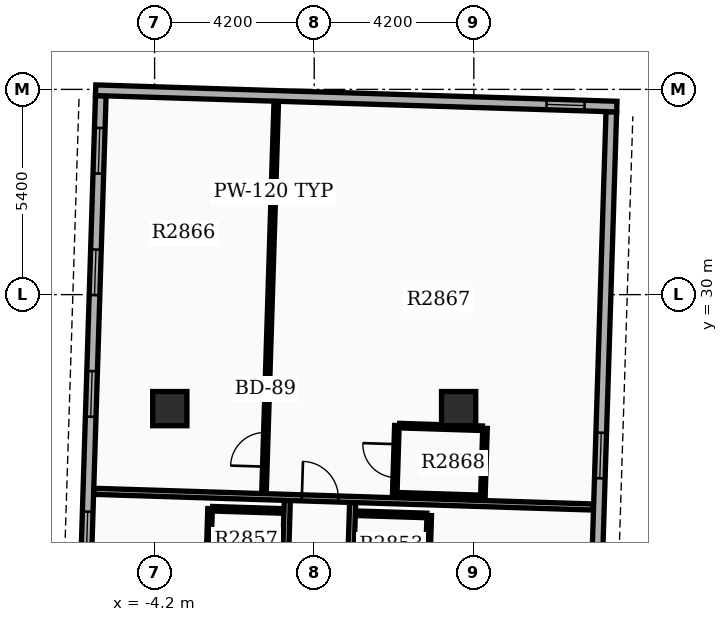
"""IFC4 building model, lengths in metres.
Left out: names, types, materials, properties, quantities, classifications, styles, units other than length and angle.
Written with IfcOpenShell. Run it as: python <this file> out.ifc"""

import sys

from ifc_helpers import new_model, si_unit, direction, frame, frame_2d, origin, origin_2d, place, context, subcontext, project, spatial, rectangle, extrude, element, fill, save


model = new_model("IFC4")
c1 = context("Model", 3, precision=1e-05, world=origin(), true_north=direction((0.0, 1.0)))
c2 = subcontext(c1, "Body", "Model", "MODEL_VIEW")
j1 = project(units=[si_unit("LENGTHUNIT", "METRE"), si_unit("PLANEANGLEUNIT", "RADIAN")], contexts=[c1])
p1 = place(None, origin())
s1 = spatial("IfcSite", under=j1, at=p1, CompositionType="ELEMENT")
p2 = place(p1, origin())
s2 = spatial("IfcBuilding", under=s1, at=p2, CompositionType="ELEMENT")
p3 = place(p2, frame((0.0, 0.0, 176.1)))
s3 = spatial("IfcBuildingStorey", under=s2, at=p3, CompositionType="ELEMENT", Elevation=176.1)
for number, where, z_axis, x_axis in (
    (1, (-3.8, 27.0, 0.0), (0.0, 0.0, 1.0), (1.0, 0.0, 0.0)),
    (2, (3.8, 27.0, 0.0), (0.0, 0.0, 1.0), (1.0, 0.0, 0.0)),
):
    element("IfcColumn", number, at=place(p3, frame(where, z_axis=z_axis, x_axis=x_axis)), inside=s3, PredefinedType="COLUMN", context=c2, shape_type="SweptSolid", body=[
        extrude(rectangle(XDim=0.9, YDim=0.9, at=origin_2d()), origin(), (0.0, 0.0, 1.0), 3.9),
    ])
p4 = place(p3, frame((7.186, 14.721, 0.0), z_axis=(0.0, 0.0, 1.0), x_axis=(0.031410322165, 0.999506574096, 0.0)))
e3 = element("IfcWall", 3, at=p4, inside=s3, PredefinedType="STANDARD", context=c2, shape_type="SweptSolid", body=[
    extrude(rectangle(XDim=20.1, YDim=0.28, at=frame_2d((10.05, 0.0))), origin(), (0.0, 0.0, 1.0), 2.97),
])
p5 = place(p4, frame((0.85, 0.0, 0.8)))
e4 = element("IfcOpeningElement", 4, at=p5, cuts=e3, PredefinedType="OPENING", context=c2, shape_type="SweptSolid", body=[
    extrude(rectangle(XDim=1.2, YDim=1.6, at=frame_2d((0.6, 0.8))), frame((0.0, 0.15, 0.0), z_axis=(0.0, -1.0, 0.0), x_axis=(1.0, 0.0, 0.0)), (0.0, 0.0, 1.0), 0.3),
])
p6 = place(p4, frame((4.05, 0.0, 0.8)))
e5 = element("IfcOpeningElement", 5, at=p6, cuts=e3, PredefinedType="OPENING", context=c2, shape_type="SweptSolid", body=[
    extrude(rectangle(XDim=1.2, YDim=1.6, at=frame_2d((0.6, 0.8))), frame((0.0, 0.15, 0.0), z_axis=(0.0, -1.0, 0.0), x_axis=(1.0, 0.0, 0.0)), (0.0, 0.0, 1.0), 0.3),
])
p7 = place(p4, frame((7.25, 0.0, 0.8)))
e6 = element("IfcOpeningElement", 6, at=p7, cuts=e3, PredefinedType="OPENING", context=c2, shape_type="SweptSolid", body=[
    extrude(rectangle(XDim=1.2, YDim=1.6, at=frame_2d((0.6, 0.8))), frame((0.0, 0.15, 0.0), z_axis=(0.0, -1.0, 0.0), x_axis=(1.0, 0.0, 0.0)), (0.0, 0.0, 1.0), 0.3),
])
p8 = place(p4, frame((10.45, 0.0, 0.8)))
e7 = element("IfcOpeningElement", 7, at=p8, cuts=e3, PredefinedType="OPENING", context=c2, shape_type="SweptSolid", body=[
    extrude(rectangle(XDim=1.2, YDim=1.6, at=frame_2d((0.6, 0.8))), frame((0.0, 0.15, 0.0), z_axis=(0.0, -1.0, 0.0), x_axis=(1.0, 0.0, 0.0)), (0.0, 0.0, 1.0), 0.3),
])
p9 = place(p3, frame((-5.616, 35.234, 0.0), z_axis=(0.0, 0.0, 1.0), x_axis=(-0.031398187845, -0.999506955354, 0.0)))
e8 = element("IfcWall", 8, at=p9, inside=s3, PredefinedType="STANDARD", context=c2, shape_type="SweptSolid", body=[
    extrude(rectangle(XDim=20.1, YDim=0.28, at=frame_2d((10.05, 0.0))), origin(), (0.0, 0.0, 1.0), 2.97),
])
p10 = place(p9, frame((0.85, 0.0, 0.8)))
e9 = element("IfcOpeningElement", 9, at=p10, cuts=e8, PredefinedType="OPENING", context=c2, shape_type="SweptSolid", body=[
    extrude(rectangle(XDim=1.2, YDim=1.6, at=frame_2d((0.6, 0.8))), frame((0.0, 0.15, 0.0), z_axis=(0.0, -1.0, 0.0), x_axis=(1.0, 0.0, 0.0)), (0.0, 0.0, 1.0), 0.3),
])
p11 = place(p9, frame((4.05, 0.0, 0.8)))
e10 = element("IfcOpeningElement", 10, at=p11, cuts=e8, PredefinedType="OPENING", context=c2, shape_type="SweptSolid", body=[
    extrude(rectangle(XDim=1.2, YDim=1.6, at=frame_2d((0.6, 0.8))), frame((0.0, 0.15, 0.0), z_axis=(0.0, -1.0, 0.0), x_axis=(1.0, 0.0, 0.0)), (0.0, 0.0, 1.0), 0.3),
])
p12 = place(p9, frame((7.25, 0.0, 0.8)))
e11 = element("IfcOpeningElement", 11, at=p12, cuts=e8, PredefinedType="OPENING", context=c2, shape_type="SweptSolid", body=[
    extrude(rectangle(XDim=1.2, YDim=1.6, at=frame_2d((0.6, 0.8))), frame((0.0, 0.15, 0.0), z_axis=(0.0, -1.0, 0.0), x_axis=(1.0, 0.0, 0.0)), (0.0, 0.0, 1.0), 0.3),
])
p13 = place(p9, frame((10.95, 0.0, 0.8)))
e12 = element("IfcOpeningElement", 12, at=p13, cuts=e8, PredefinedType="OPENING", context=c2, shape_type="SweptSolid", body=[
    extrude(rectangle(XDim=1.2, YDim=1.6, at=frame_2d((0.6, 0.8))), frame((0.0, 0.15, 0.0), z_axis=(0.0, -1.0, 0.0), x_axis=(1.0, 0.0, 0.0)), (0.0, 0.0, 1.0), 0.3),
])
p14 = place(p9, frame((14.799, 0.0, 0.85)))
e13 = element("IfcOpeningElement", 13, at=p14, cuts=e8, PredefinedType="OPENING", context=c2, shape_type="SweptSolid", body=[
    extrude(rectangle(XDim=1.2, YDim=1.6, at=frame_2d((0.6, 0.8))), frame((0.0, 0.15, 0.0), z_axis=(0.0, -1.0, 0.0), x_axis=(1.0, 0.0, 0.0)), (0.0, 0.0, 1.0), 0.3),
])
p15 = place(p3, frame((7.962, 34.947, 0.0), z_axis=(0.0, 0.0, 1.0), x_axis=(-0.999506679556, 0.031406966164, 0.0)))
e14 = element("IfcWall", 14, at=p15, inside=s3, PredefinedType="STANDARD", context=c2, shape_type="SweptSolid", body=[
    extrude(rectangle(XDim=13.72, YDim=0.28, at=frame_2d((6.86, 0.0))), origin(), (0.0, 0.0, 1.0), 2.97),
])
p16 = place(p15, frame((0.85, 0.0, 0.85)))
e15 = element("IfcOpeningElement", 15, at=p16, cuts=e14, PredefinedType="OPENING", context=c2, shape_type="SweptSolid", body=[
    extrude(rectangle(XDim=1.0, YDim=1.5, at=frame_2d((0.5, 0.75))), frame((0.0, 0.15, 0.0), z_axis=(0.0, -1.0, 0.0), x_axis=(1.0, 0.0, 0.0)), (0.0, 0.0, 1.0), 0.3),
])
p17 = place(p3, frame((0.706, 14.835, 0.0), z_axis=(0.0, 0.0, 1.0), x_axis=(0.031411552371, 0.999506535435, 0.0)))
e16 = element("IfcWall", 16, at=p17, inside=s3, PredefinedType="PARTITIONING", context=c2, shape_type="SweptSolid", body=[
    extrude(rectangle(XDim=9.7, YDim=0.16, at=frame_2d((4.85, 0.0))), origin(), (0.0, 0.0, 1.0), 2.96),
])
p18 = place(p17, frame((2.575, 0.0, 0.0)))
e17 = element("IfcOpeningElement", 17, at=p18, cuts=e16, PredefinedType="OPENING", context=c2, shape_type="SweptSolid", body=[
    extrude(rectangle(XDim=0.96, YDim=2.15, at=frame_2d((0.48, 1.075))), frame((0.0, 0.09, 0.0), z_axis=(0.0, -1.0, 0.0), x_axis=(1.0, 0.0, 0.0)), (0.0, 0.0, 1.0), 0.18),
])
p19 = place(p17, frame((6.467, 0.0, 0.0)))
e18 = element("IfcOpeningElement", 18, at=p19, cuts=e16, PredefinedType="OPENING", context=c2, shape_type="SweptSolid", body=[
    extrude(rectangle(XDim=0.96, YDim=2.15, at=frame_2d((0.48, 1.075))), frame((0.0, 0.09, 0.0), z_axis=(0.0, -1.0, 0.0), x_axis=(1.0, 0.0, 0.0)), (0.0, 0.0, 1.0), 0.18),
])
p20 = place(p3, frame((1.142, 24.246, 0.0), z_axis=(0.0, 0.0, 1.0), x_axis=(0.999507221803, -0.031389704724, 0.0)))
e19 = element("IfcWall", 19, at=p20, inside=s3, PredefinedType="PARTITIONING", context=c2, shape_type="SweptSolid", body=[
    extrude(rectangle(XDim=1.82, YDim=0.12, at=frame_2d((0.91, 0.0))), origin(), (0.0, 0.0, 1.0), 2.96),
])
p21 = place(p3, frame((2.976, 22.588, 0.0), z_axis=(0.0, 0.0, 1.0), x_axis=(0.031277621856, 0.999510735496, 0.0)))
e20 = element("IfcWall", 20, at=p21, inside=s3, PredefinedType="PARTITIONING", context=c2, shape_type="SweptSolid", body=[
    extrude(rectangle(XDim=1.6, YDim=0.12, at=frame_2d((0.8, 0.0))), origin(), (0.0, 0.0, 1.0), 2.96),
])
p22 = place(p3, frame((-1.013, 14.889, 0.0), z_axis=(0.0, 0.0, 1.0), x_axis=(0.031410762168, 0.999506560269, 0.0)))
e21 = element("IfcWall", 21, at=p22, inside=s3, PredefinedType="PARTITIONING", context=c2, shape_type="SweptSolid", body=[
    extrude(rectangle(XDim=9.7, YDim=0.16, at=frame_2d((4.85, 0.0))), origin(), (0.0, 0.0, 1.0), 2.96),
])
p23 = place(p22, frame((2.575, 0.0, 0.0)))
e22 = element("IfcOpeningElement", 22, at=p23, cuts=e21, PredefinedType="OPENING", context=c2, shape_type="SweptSolid", body=[
    extrude(rectangle(XDim=0.96, YDim=2.15, at=frame_2d((0.48, 1.075))), frame((0.0, 0.09, 0.0), z_axis=(0.0, -1.0, 0.0), x_axis=(1.0, 0.0, 0.0)), (0.0, 0.0, 1.0), 0.18),
])
p24 = place(p22, frame((6.467, 0.0, 0.0)))
e23 = element("IfcOpeningElement", 23, at=p24, cuts=e21, PredefinedType="OPENING", context=c2, shape_type="SweptSolid", body=[
    extrude(rectangle(XDim=0.96, YDim=2.15, at=frame_2d((0.48, 1.075))), frame((0.0, 0.09, 0.0), z_axis=(0.0, -1.0, 0.0), x_axis=(1.0, 0.0, 0.0)), (0.0, 0.0, 1.0), 0.18),
])
p25 = place(p3, frame((-2.676, 24.366, 0.0), z_axis=(0.0, 0.0, 1.0), x_axis=(0.999503004171, -0.03152371574, 0.0)))
e24 = element("IfcWall", 24, at=p25, inside=s3, PredefinedType="PARTITIONING", context=c2, shape_type="SweptSolid", body=[
    extrude(rectangle(XDim=1.82, YDim=0.12, at=frame_2d((0.91, 0.0))), origin(), (0.0, 0.0, 1.0), 2.96),
])
p26 = place(p3, frame((-2.791, 22.769, 0.0), z_axis=(0.0, 0.0, 1.0), x_axis=(0.031430045267, 0.999505954087, 0.0)))
e25 = element("IfcWall", 25, at=p26, inside=s3, PredefinedType="PARTITIONING", context=c2, shape_type="SweptSolid", body=[
    extrude(rectangle(XDim=1.6, YDim=0.12, at=frame_2d((0.8, 0.0))), origin(), (0.0, 0.0, 1.0), 2.96),
])
p27 = place(p3, frame((-5.795, 24.824, 0.0), z_axis=(0.0, 0.0, 1.0), x_axis=(0.999507189267, -0.031390740738, 0.0)))
e26 = element("IfcWall", 26, at=p27, inside=s3, PredefinedType="PARTITIONING", context=c2, shape_type="SweptSolid", body=[
    extrude(rectangle(XDim=13.144, YDim=0.16, at=frame_2d((6.572, 0.0))), origin(), (0.0, 0.0, 1.0), 2.96),
])
p28 = place(p27, frame((5.472, 0.0, 0.0)))
e27 = element("IfcOpeningElement", 27, at=p28, cuts=e26, PredefinedType="OPENING", context=c2, shape_type="SweptSolid", body=[
    extrude(rectangle(XDim=0.96, YDim=2.15, at=frame_2d((0.48, 1.075))), frame((0.0, 0.09, 0.0), z_axis=(0.0, -1.0, 0.0), x_axis=(1.0, 0.0, 0.0)), (0.0, 0.0, 1.0), 0.18),
])
p29 = place(p3, frame((-1.323, 24.774, 0.0), z_axis=(0.0, 0.0, 1.0), x_axis=(0.031416574993, 0.999506377576, 0.0)))
e28 = element("IfcWall", 28, at=p29, inside=s3, PredefinedType="PARTITIONING", context=c2, shape_type="SweptSolid", body=[
    extrude(rectangle(XDim=10.312, YDim=0.12, at=frame_2d((5.156, 0.0))), origin(), (0.0, 0.0, 1.0), 2.96),
])
p30 = place(p29, frame((0.7, 0.0, 0.0)))
e29 = element("IfcOpeningElement", 29, at=p30, cuts=e28, PredefinedType="OPENING", context=c2, shape_type="SweptSolid", body=[
    extrude(rectangle(XDim=0.9, YDim=2.1, at=frame_2d((0.45, 1.05))), frame((0.0, 0.07, 0.0), z_axis=(0.0, -1.0, 0.0), x_axis=(1.0, 0.0, 0.0)), (0.0, 0.0, 1.0), 0.14),
])
p31 = place(p3, frame((2.118, 24.736, 0.0), z_axis=(0.0, 0.0, 1.0), x_axis=(0.03152371574, 0.999503004171, 0.0)))
e30 = element("IfcWall", 30, at=p31, inside=s3, PredefinedType="PARTITIONING", context=c2, shape_type="SweptSolid", body=[
    extrude(rectangle(XDim=1.82, YDim=0.12, at=frame_2d((0.91, 0.0))), origin(), (0.0, 0.0, 1.0), 2.96),
])
p32 = place(p31, frame((0.45, 0.0, 0.0)))
e31 = element("IfcOpeningElement", 31, at=p32, cuts=e30, PredefinedType="OPENING", context=c2, shape_type="SweptSolid", body=[
    extrude(rectangle(XDim=0.88, YDim=2.1, at=frame_2d((0.44, 1.05))), frame((0.0, 0.07, 0.0), z_axis=(0.0, -1.0, 0.0), x_axis=(1.0, 0.0, 0.0)), (0.0, 0.0, 1.0), 0.14),
])
p33 = place(p3, frame((4.437, 24.663, 0.0), z_axis=(0.0, 0.0, 1.0), x_axis=(0.031255692016, 0.999511421504, 0.0)))
e32 = element("IfcWall", 32, at=p33, inside=s3, PredefinedType="PARTITIONING", context=c2, shape_type="SweptSolid", body=[
    extrude(rectangle(XDim=1.82, YDim=0.12, at=frame_2d((0.91, 0.0))), origin(), (0.0, 0.0, 1.0), 2.96),
])
for number, where, z_axis, x_axis in (
    (33, (2.188, 24.733, 0.0), (0.0, 0.0, 1.0), (1.0, -0.031, 0.0)),
    (34, (2.245, 26.552, 0.0), (0.0, 0.0, 1.0), (1.0, -0.031, 0.0)),
):
    element("IfcWall", number, at=place(p3, frame(where, z_axis=z_axis, x_axis=x_axis)), inside=s3, PredefinedType="PARTITIONING", context=c2, shape_type="SweptSolid", body=[
        extrude(rectangle(XDim=2.18, YDim=0.12, at=frame_2d((1.09, 0.0))), origin(), (0.0, 0.0, 1.0), 2.96),
    ])
p34 = place(p8, origin())
e35 = element("IfcWindow", 35, at=p34, inside=s3, PartitioningType="SINGLE_PANEL", PredefinedType="WINDOW", context=c2, shape_type="SweptSolid", body=[
    extrude(rectangle(XDim=1.2, YDim=1.6, at=frame_2d((0.6, 0.8))), frame((0.0, 0.03, 0.0), z_axis=(0.0, -1.0, 0.0), x_axis=(1.0, 0.0, 0.0)), (0.0, 0.0, 1.0), 0.06),
])
fill(e7, e35)
p35 = place(p10, origin())
e36 = element("IfcWindow", 36, at=p35, inside=s3, PartitioningType="SINGLE_PANEL", PredefinedType="WINDOW", context=c2, shape_type="SweptSolid", body=[
    extrude(rectangle(XDim=1.2, YDim=1.6, at=frame_2d((0.6, 0.8))), frame((0.0, 0.03, 0.0), z_axis=(0.0, -1.0, 0.0), x_axis=(1.0, 0.0, 0.0)), (0.0, 0.0, 1.0), 0.06),
])
fill(e9, e36)
p36 = place(p11, origin())
e37 = element("IfcWindow", 37, at=p36, inside=s3, PartitioningType="SINGLE_PANEL", PredefinedType="WINDOW", context=c2, shape_type="SweptSolid", body=[
    extrude(rectangle(XDim=1.2, YDim=1.6, at=frame_2d((0.6, 0.8))), frame((0.0, 0.03, 0.0), z_axis=(0.0, -1.0, 0.0), x_axis=(1.0, 0.0, 0.0)), (0.0, 0.0, 1.0), 0.06),
])
fill(e10, e37)
p37 = place(p12, origin())
e38 = element("IfcWindow", 38, at=p37, inside=s3, PartitioningType="SINGLE_PANEL", PredefinedType="WINDOW", context=c2, shape_type="SweptSolid", body=[
    extrude(rectangle(XDim=1.2, YDim=1.6, at=frame_2d((0.6, 0.8))), frame((0.0, 0.03, 0.0), z_axis=(0.0, -1.0, 0.0), x_axis=(1.0, 0.0, 0.0)), (0.0, 0.0, 1.0), 0.06),
])
fill(e11, e38)
p38 = place(p13, origin())
e39 = element("IfcWindow", 39, at=p38, inside=s3, PartitioningType="SINGLE_PANEL", PredefinedType="WINDOW", context=c2, shape_type="SweptSolid", body=[
    extrude(rectangle(XDim=1.2, YDim=1.6, at=frame_2d((0.6, 0.8))), frame((0.0, 0.03, 0.0), z_axis=(0.0, -1.0, 0.0), x_axis=(1.0, 0.0, 0.0)), (0.0, 0.0, 1.0), 0.06),
])
fill(e12, e39)
p39 = place(p16, origin())
e40 = element("IfcWindow", 40, at=p39, inside=s3, PartitioningType="SINGLE_PANEL", PredefinedType="WINDOW", context=c2, shape_type="SweptSolid", body=[
    extrude(rectangle(XDim=1.0, YDim=1.5, at=frame_2d((0.5, 0.75))), frame((0.0, 0.03, 0.0), z_axis=(0.0, -1.0, 0.0), x_axis=(1.0, 0.0, 0.0)), (0.0, 0.0, 1.0), 0.06),
])
fill(e15, e40)
p40 = place(p28, origin())
e41 = element("IfcDoor", 41, at=p40, inside=s3, OperationType="SINGLE_SWING_LEFT", PredefinedType="DOOR", context=c2, shape_type="SweptSolid", body=[
    extrude(rectangle(XDim=0.96, YDim=2.15, at=frame_2d((0.48, 1.075))), frame((0.0, 0.025, 0.0), z_axis=(0.0, -1.0, 0.0), x_axis=(1.0, 0.0, 0.0)), (0.0, 0.0, 1.0), 0.05),
])
fill(e27, e41)
p41 = place(p30, origin())
e42 = element("IfcDoor", 42, at=p41, inside=s3, OperationType="SINGLE_SWING_LEFT", PredefinedType="DOOR", context=c2, shape_type="SweptSolid", body=[
    extrude(rectangle(XDim=0.9, YDim=2.1, at=frame_2d((0.45, 1.05))), frame((0.0, 0.025, 0.0), z_axis=(0.0, -1.0, 0.0), x_axis=(1.0, 0.0, 0.0)), (0.0, 0.0, 1.0), 0.05),
])
fill(e29, e42)
p42 = place(p32, origin())
e43 = element("IfcDoor", 43, at=p42, inside=s3, OperationType="SINGLE_SWING_RIGHT", PredefinedType="DOOR", context=c2, shape_type="SweptSolid", body=[
    extrude(rectangle(XDim=0.88, YDim=2.1, at=frame_2d((0.44, 1.05))), frame((0.0, 0.025, 0.0), z_axis=(0.0, -1.0, 0.0), x_axis=(1.0, 0.0, 0.0)), (0.0, 0.0, 1.0), 0.05),
])
fill(e31, e43)
save(model, sys.argv[1])
